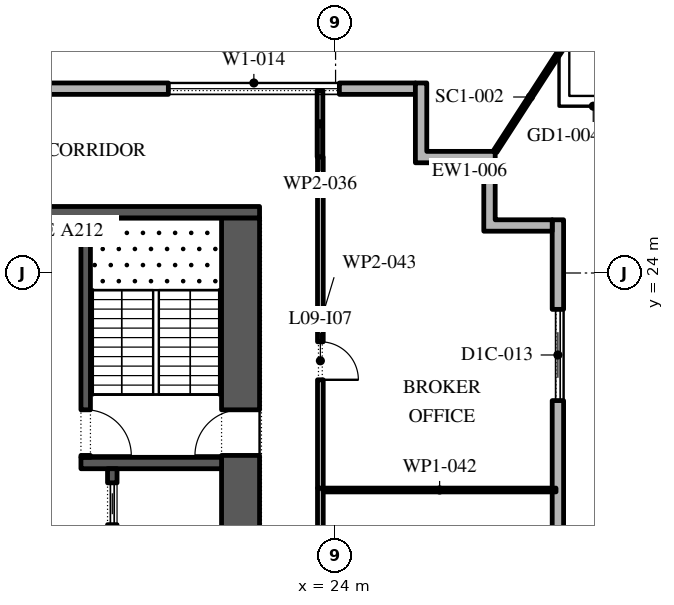
"""IFC4 building model, lengths in metres.
Left out: names, types, materials, properties, quantities, classifications, styles, units other than length and angle.
Written with IfcOpenShell. Run it as: python <this file> out.ifc"""

import sys

from ifc_helpers import new_model, si_unit, direction, frame, frame_2d, origin, place, context, subcontext, project, spatial, polyline, rectangle, outline, extrude, element, fill, save


model = new_model("IFC4")
c1 = context("Model", 3, precision=1e-05, world=origin(), true_north=direction((0.0, 1.0)))
c2 = subcontext(c1, "Body", "Model", "MODEL_VIEW")
j1 = project(units=[si_unit("LENGTHUNIT", "METRE"), si_unit("PLANEANGLEUNIT", "RADIAN")], contexts=[c1])
p1 = place(None, origin())
s1 = spatial("IfcSite", under=j1, at=p1, CompositionType="ELEMENT")
p2 = place(p1, origin())
s2 = spatial("IfcBuilding", under=s1, at=p2, CompositionType="ELEMENT")
p3 = place(p2, frame((0.0, 0.0, 48.0)))
s3 = spatial("IfcBuildingStorey", under=s2, at=p3, CompositionType="ELEMENT", Elevation=48.0)
p4 = place(p3, frame((29.85, -24.1, 0.0), z_axis=(0.0, 0.0, 1.0), x_axis=(0.0, 1.0, 0.0)))
e1 = element("IfcWall", 1, at=p4, inside=s3, PredefinedType="STANDARD", context=c2, shape_type="SweptSolid", body=[
    extrude(rectangle(XDim=49.5, YDim=0.3, at=frame_2d((24.75, 0.0))), origin(), (0.0, 0.0, 1.0), 4.0),
])
p5 = place(p4, frame((1.157, 0.0, 0.45)))
e2 = element("IfcOpeningElement", 2, at=p5, cuts=e1, PredefinedType="OPENING", context=c2, shape_type="SweptSolid", body=[
    extrude(rectangle(XDim=4.5, YDim=3.05, at=frame_2d((2.25, 1.525))), frame((0.0, 0.16, 0.0), z_axis=(0.0, -1.0, 0.0), x_axis=(1.0, 0.0, 0.0)), (0.0, 0.0, 1.0), 0.32),
])
p6 = place(p4, frame((8.121, 0.0, 0.45)))
e3 = element("IfcOpeningElement", 3, at=p6, cuts=e1, PredefinedType="OPENING", context=c2, shape_type="SweptSolid", body=[
    extrude(rectangle(XDim=4.5, YDim=2.825, at=frame_2d((2.25, 1.413))), frame((0.0, 0.16, 0.0), z_axis=(0.0, -1.0, 0.0), x_axis=(1.0, 0.0, 0.0)), (0.0, 0.0, 1.0), 0.32),
])
p7 = place(p4, frame((16.286, 0.0, 0.0)))
e4 = element("IfcOpeningElement", 4, at=p7, cuts=e1, PredefinedType="OPENING", context=c2, shape_type="SweptSolid", body=[
    extrude(rectangle(XDim=2.4, YDim=3.325, at=frame_2d((1.2, 1.663))), frame((0.0, 0.16, 0.0), z_axis=(0.0, -1.0, 0.0), x_axis=(1.0, 0.0, 0.0)), (0.0, 0.0, 1.0), 0.32),
])
p8 = place(p4, frame((22.35, 0.0, 0.45)))
e5 = element("IfcOpeningElement", 5, at=p8, cuts=e1, PredefinedType="OPENING", context=c2, shape_type="SweptSolid", body=[
    extrude(rectangle(XDim=4.5, YDim=2.875, at=frame_2d((2.25, 1.438))), frame((0.0, 0.16, 0.0), z_axis=(0.0, -1.0, 0.0), x_axis=(1.0, 0.0, 0.0)), (0.0, 0.0, 1.0), 0.32),
])
p9 = place(p4, frame((29.464, 0.0, 0.45)))
e6 = element("IfcOpeningElement", 6, at=p9, cuts=e1, PredefinedType="OPENING", context=c2, shape_type="SweptSolid", body=[
    extrude(rectangle(XDim=4.5, YDim=2.875, at=frame_2d((2.25, 1.438))), frame((0.0, 0.16, 0.0), z_axis=(0.0, -1.0, 0.0), x_axis=(1.0, 0.0, 0.0)), (0.0, 0.0, 1.0), 0.32),
])
p10 = place(p4, frame((36.579, 0.0, 0.45)))
e7 = element("IfcOpeningElement", 7, at=p10, cuts=e1, PredefinedType="OPENING", context=c2, shape_type="SweptSolid", body=[
    extrude(rectangle(XDim=4.5, YDim=3.05, at=frame_2d((2.25, 1.525))), frame((0.0, 0.16, 0.0), z_axis=(0.0, -1.0, 0.0), x_axis=(1.0, 0.0, 0.0)), (0.0, 0.0, 1.0), 0.32),
])
p11 = place(p4, frame((44.743, 0.0, 0.0)))
e8 = element("IfcOpeningElement", 8, at=p11, cuts=e1, PredefinedType="OPENING", context=c2, shape_type="SweptSolid", body=[
    extrude(rectangle(XDim=2.4, YDim=3.325, at=frame_2d((1.2, 1.663))), frame((0.0, 0.16, 0.0), z_axis=(0.0, -1.0, 0.0), x_axis=(1.0, 0.0, 0.0)), (0.0, 0.0, 1.0), 0.32),
])
p12 = place(p3, frame((26.1, 28.85, 0.0), z_axis=(0.0, 0.0, 1.0), x_axis=(-1.0, 0.0, 0.0)))
e9 = element("IfcWall", 9, at=p12, inside=s3, PredefinedType="STANDARD", context=c2, shape_type="SweptSolid", body=[
    extrude(rectangle(XDim=52.5, YDim=0.3, at=frame_2d((26.25, 0.0))), origin(), (0.0, 0.0, 1.0), 4.0),
])
p13 = place(p12, frame((2.0, 0.0, 0.45)))
e10 = element("IfcOpeningElement", 10, at=p13, cuts=e9, PredefinedType="OPENING", context=c2, shape_type="SweptSolid", body=[
    extrude(rectangle(XDim=4.5, YDim=3.05, at=frame_2d((2.25, 1.525))), frame((0.0, 0.16, 0.0), z_axis=(0.0, -1.0, 0.0), x_axis=(1.0, 0.0, 0.0)), (0.0, 0.0, 1.0), 0.32),
])
p14 = place(p12, frame((10.65, 0.0, 0.45)))
e11 = element("IfcOpeningElement", 11, at=p14, cuts=e9, PredefinedType="OPENING", context=c2, shape_type="SweptSolid", body=[
    extrude(rectangle(XDim=4.5, YDim=3.05, at=frame_2d((2.25, 1.525))), frame((0.0, 0.16, 0.0), z_axis=(0.0, -1.0, 0.0), x_axis=(1.0, 0.0, 0.0)), (0.0, 0.0, 1.0), 0.32),
])
p15 = place(p12, frame((20.5, 0.0, 0.0)))
e12 = element("IfcOpeningElement", 12, at=p15, cuts=e9, PredefinedType="OPENING", context=c2, shape_type="SweptSolid", body=[
    extrude(rectangle(XDim=2.4, YDim=3.5, at=frame_2d((1.2, 1.75))), frame((0.0, 0.16, 0.0), z_axis=(0.0, -1.0, 0.0), x_axis=(1.0, 0.0, 0.0)), (0.0, 0.0, 1.0), 0.32),
])
p16 = place(p12, frame((28.25, 0.0, 0.45)))
e13 = element("IfcOpeningElement", 13, at=p16, cuts=e9, PredefinedType="OPENING", context=c2, shape_type="SweptSolid", body=[
    extrude(rectangle(XDim=4.5, YDim=3.05, at=frame_2d((2.25, 1.525))), frame((0.0, 0.16, 0.0), z_axis=(0.0, -1.0, 0.0), x_axis=(1.0, 0.0, 0.0)), (0.0, 0.0, 1.0), 0.32),
])
p17 = place(p12, frame((37.05, 0.0, 0.45)))
e14 = element("IfcOpeningElement", 14, at=p17, cuts=e9, PredefinedType="OPENING", context=c2, shape_type="SweptSolid", body=[
    extrude(rectangle(XDim=4.5, YDim=3.05, at=frame_2d((2.25, 1.525))), frame((0.0, 0.16, 0.0), z_axis=(0.0, -1.0, 0.0), x_axis=(1.0, 0.0, 0.0)), (0.0, 0.0, 1.0), 0.32),
])
p18 = place(p12, frame((45.85, 0.0, 0.45)))
e15 = element("IfcOpeningElement", 15, at=p18, cuts=e9, PredefinedType="OPENING", context=c2, shape_type="SweptSolid", body=[
    extrude(rectangle(XDim=4.5, YDim=3.05, at=frame_2d((2.25, 1.525))), frame((0.0, 0.16, 0.0), z_axis=(0.0, -1.0, 0.0), x_axis=(1.0, 0.0, 0.0)), (0.0, 0.0, 1.0), 0.32),
])
p19 = place(p3, origin())
e16 = element("IfcWall", 16, at=p19, inside=s3, PredefinedType="STANDARD", context=c2, shape_type="SweptSolid", body=[
    extrude(outline(polyline([(27.9, 26.9), (26.1, 26.9), (26.1, 29.0), (26.4, 29.0), (26.4, 27.2), (28.2, 27.2), (28.2, 25.4), (29.7, 25.4), (29.7, 25.1), (27.9, 25.1), (27.9, 26.9)])), origin(), (0.0, 0.0, 1.0), 4.0),
])
p20 = place(p3, frame((28.2, 27.2, -0.05), z_axis=(0.0, 0.0, 1.0), x_axis=(0.543224544992, 0.839587454479, 0.0)))
e17 = element("IfcWall", 17, at=p20, inside=s3, PredefinedType="STANDARD", context=c2, shape_type="SweptSolid", body=[
    extrude(rectangle(XDim=3.408, YDim=0.1, at=frame_2d((1.704, 0.0))), origin(), (0.0, 0.0, 1.0), 4.05),
])
p21 = place(p3, frame((21.5, -2.45, 0.0), z_axis=(0.0, 0.0, 1.0), x_axis=(0.0, 1.0, 0.0)))
e18 = element("IfcWall", 18, at=p21, inside=s3, PredefinedType="SHEAR", context=c2, shape_type="SweptSolid", body=[
    extrude(rectangle(XDim=27.9, YDim=1.0, at=frame_2d((13.95, 0.0))), origin(), (0.0, 0.0, 1.0), 4.0),
])
p22 = place(p21, frame((5.05, 0.0, 0.0)))
e19 = element("IfcOpeningElement", 19, at=p22, cuts=e18, PredefinedType="OPENING", context=c2, shape_type="SweptSolid", body=[
    extrude(rectangle(XDim=1.2, YDim=2.1, at=frame_2d((0.6, 1.05))), frame((0.0, 0.51, 0.0), z_axis=(0.0, -1.0, 0.0), x_axis=(1.0, 0.0, 0.0)), (0.0, 0.0, 1.0), 1.02),
])
p23 = place(p21, frame((21.65, 0.0, 0.0)))
e20 = element("IfcOpeningElement", 20, at=p23, cuts=e18, PredefinedType="OPENING", context=c2, shape_type="SweptSolid", body=[
    extrude(rectangle(XDim=1.2, YDim=2.1, at=frame_2d((0.6, 1.05))), frame((0.0, 0.51, 0.0), z_axis=(0.0, -1.0, 0.0), x_axis=(1.0, 0.0, 0.0)), (0.0, 0.0, 1.0), 1.02),
])
p24 = place(p3, frame((10.0, 25.6, 0.0), z_axis=(0.0, 0.0, 1.0), x_axis=(1.0, 0.0, 0.0)))
e21 = element("IfcWall", 21, at=p24, inside=s3, PredefinedType="SHEAR", context=c2, shape_type="SweptSolid", body=[
    extrude(rectangle(XDim=12.0, YDim=0.3, at=frame_2d((6.0, 0.0))), origin(), (0.0, 0.0, 1.0), 4.0),
])
p25 = place(p3, frame((17.3, 19.0, 0.0), z_axis=(0.0, 0.0, 1.0), x_axis=(1.0, 0.0, 0.0)))
e22 = element("IfcWall", 22, at=p25, inside=s3, PredefinedType="SHEAR", context=c2, shape_type="SweptSolid", body=[
    extrude(rectangle(XDim=3.7, YDim=0.3, at=frame_2d((1.85, 0.0))), origin(), (0.0, 0.0, 1.0), 4.0),
])
p26 = place(p3, frame((17.425, 19.15, 0.0), z_axis=(0.0, 0.0, 1.0), x_axis=(0.0, 1.0, 0.0)))
e23 = element("IfcWall", 23, at=p26, inside=s3, PredefinedType="SHEAR", context=c2, shape_type="SweptSolid", body=[
    extrude(rectangle(XDim=6.3, YDim=0.25, at=frame_2d((3.15, 0.0))), origin(), (0.0, 0.0, 1.0), 4.0),
])
p27 = place(p26, frame((0.05, 0.0, 0.0)))
e24 = element("IfcOpeningElement", 24, at=p27, cuts=e23, PredefinedType="OPENING", context=c2, shape_type="SweptSolid", body=[
    extrude(rectangle(XDim=1.2, YDim=2.1, at=frame_2d((0.6, 1.05))), frame((0.0, 0.135, 0.0), z_axis=(0.0, -1.0, 0.0), x_axis=(1.0, 0.0, 0.0)), (0.0, 0.0, 1.0), 0.27),
])
p28 = place(p3, frame((18.125, 4.15, 0.0), z_axis=(0.0, 0.0, 1.0), x_axis=(0.0, 1.0, 0.0)))
e25 = element("IfcWall", 25, at=p28, inside=s3, PredefinedType="SHEAR", context=c2, shape_type="SweptSolid", body=[
    extrude(rectangle(XDim=14.7, YDim=0.25, at=frame_2d((7.35, 0.0))), origin(), (0.0, 0.0, 1.0), 4.0),
])
p29 = place(p28, frame((0.371, 0.0, 0.0)))
e26 = element("IfcOpeningElement", 26, at=p29, cuts=e25, PredefinedType="OPENING", context=c2, shape_type="SweptSolid", body=[
    extrude(rectangle(XDim=1.1, YDim=2.1, at=frame_2d((0.55, 1.05))), frame((0.0, 0.135, 0.0), z_axis=(0.0, -1.0, 0.0), x_axis=(1.0, 0.0, 0.0)), (0.0, 0.0, 1.0), 0.27),
])
p30 = place(p28, frame((2.514, 0.0, 0.0)))
e27 = element("IfcOpeningElement", 27, at=p30, cuts=e25, PredefinedType="OPENING", context=c2, shape_type="SweptSolid", body=[
    extrude(rectangle(XDim=1.1, YDim=2.1, at=frame_2d((0.55, 1.05))), frame((0.0, 0.135, 0.0), z_axis=(0.0, -1.0, 0.0), x_axis=(1.0, 0.0, 0.0)), (0.0, 0.0, 1.0), 0.27),
])
p31 = place(p28, frame((4.657, 0.0, 0.0)))
e28 = element("IfcOpeningElement", 28, at=p31, cuts=e25, PredefinedType="OPENING", context=c2, shape_type="SweptSolid", body=[
    extrude(rectangle(XDim=1.1, YDim=2.1, at=frame_2d((0.55, 1.05))), frame((0.0, 0.135, 0.0), z_axis=(0.0, -1.0, 0.0), x_axis=(1.0, 0.0, 0.0)), (0.0, 0.0, 1.0), 0.27),
])
p32 = place(p28, frame((6.8, 0.0, 0.0)))
e29 = element("IfcOpeningElement", 29, at=p32, cuts=e25, PredefinedType="OPENING", context=c2, shape_type="SweptSolid", body=[
    extrude(rectangle(XDim=1.1, YDim=2.1, at=frame_2d((0.55, 1.05))), frame((0.0, 0.135, 0.0), z_axis=(0.0, -1.0, 0.0), x_axis=(1.0, 0.0, 0.0)), (0.0, 0.0, 1.0), 0.27),
])
p33 = place(p28, frame((8.943, 0.0, 0.0)))
e30 = element("IfcOpeningElement", 30, at=p33, cuts=e25, PredefinedType="OPENING", context=c2, shape_type="SweptSolid", body=[
    extrude(rectangle(XDim=1.1, YDim=2.1, at=frame_2d((0.55, 1.05))), frame((0.0, 0.135, 0.0), z_axis=(0.0, -1.0, 0.0), x_axis=(1.0, 0.0, 0.0)), (0.0, 0.0, 1.0), 0.27),
])
p34 = place(p28, frame((11.086, 0.0, 0.0)))
e31 = element("IfcOpeningElement", 31, at=p34, cuts=e25, PredefinedType="OPENING", context=c2, shape_type="SweptSolid", body=[
    extrude(rectangle(XDim=1.1, YDim=2.1, at=frame_2d((0.55, 1.05))), frame((0.0, 0.135, 0.0), z_axis=(0.0, -1.0, 0.0), x_axis=(1.0, 0.0, 0.0)), (0.0, 0.0, 1.0), 0.27),
])
p35 = place(p28, frame((13.229, 0.0, 0.0)))
e32 = element("IfcOpeningElement", 32, at=p35, cuts=e25, PredefinedType="OPENING", context=c2, shape_type="SweptSolid", body=[
    extrude(rectangle(XDim=1.1, YDim=2.1, at=frame_2d((0.55, 1.05))), frame((0.0, 0.135, 0.0), z_axis=(0.0, -1.0, 0.0), x_axis=(1.0, 0.0, 0.0)), (0.0, 0.0, 1.0), 0.27),
])
p36 = place(p3, frame((23.59, 28.8, 0.0), z_axis=(0.0, 0.0, 1.0), x_axis=(0.0, -1.0, 0.0)))
e33 = element("IfcWall", 33, at=p36, inside=s3, PredefinedType="PARTITIONING", context=c2, shape_type="SweptSolid", body=[
    extrude(rectangle(XDim=1.75, YDim=0.15, at=frame_2d((0.875, 0.0))), origin(), (0.0, 0.0, 1.0), 4.0),
])
p37 = place(p3, frame((23.6, 18.34, 0.0), z_axis=(0.0, 0.0, 1.0), x_axis=(0.0, -1.0, 0.0)))
e34 = element("IfcWall", 34, at=p37, inside=s3, PredefinedType="PARTITIONING", context=c2, shape_type="SweptSolid", body=[
    extrude(rectangle(XDim=14.23, YDim=0.15, at=frame_2d((7.115, 0.0))), origin(), (0.0, 0.0, 1.0), 4.0),
])
p38 = place(p37, frame((6.63, 0.0, 0.0)))
e35 = element("IfcOpeningElement", 35, at=p38, cuts=e34, PredefinedType="OPENING", context=c2, shape_type="SweptSolid", body=[
    extrude(rectangle(XDim=1.0, YDim=2.1, at=frame_2d((0.5, 1.05))), frame((0.0, 0.085, 0.0), z_axis=(0.0, -1.0, 0.0), x_axis=(1.0, 0.0, 0.0)), (0.0, 0.0, 1.0), 0.17),
])
p39 = place(p3, frame((23.675, 18.29, 0.0), z_axis=(0.0, 0.0, 1.0), x_axis=(1.0, 0.0, 0.0)))
e36 = element("IfcWall", 36, at=p39, inside=s3, PredefinedType="PARTITIONING", context=c2, shape_type="SweptSolid", body=[
    extrude(rectangle(XDim=6.125, YDim=0.1, at=frame_2d((3.062, 0.0))), origin(), (0.0, 0.0, 1.0), 4.0),
])
p40 = place(p3, frame((23.6, 27.05, 0.0), z_axis=(0.0, 0.0, 1.0), x_axis=(0.0, -1.0, 0.0)))
e37 = element("IfcWall", 37, at=p40, inside=s3, PredefinedType="PARTITIONING", context=c2, shape_type="SweptSolid", body=[
    extrude(rectangle(XDim=8.71, YDim=0.15, at=frame_2d((4.355, 0.0))), origin(), (0.0, 0.0, 1.0), 4.0),
])
p41 = place(p40, frame((4.86, 0.0, 0.0)))
e38 = element("IfcOpeningElement", 38, at=p41, cuts=e37, PredefinedType="OPENING", context=c2, shape_type="SweptSolid", body=[
    extrude(rectangle(XDim=1.0, YDim=2.1, at=frame_2d((0.5, 1.05))), frame((0.0, 0.085, 0.0), z_axis=(0.0, -1.0, 0.0), x_axis=(1.0, 0.0, 0.0)), (0.0, 0.0, 1.0), 0.17),
])
p42 = place(p11, origin())
e39 = element("IfcDoor", 39, at=p42, inside=s3, OperationType="DOUBLE_DOOR_SLIDING", PredefinedType="DOOR", context=c2, shape_type="SweptSolid", body=[
    extrude(rectangle(XDim=2.4, YDim=3.325, at=frame_2d((1.2, 1.663))), frame((0.0, 0.025, 0.0), z_axis=(0.0, -1.0, 0.0), x_axis=(1.0, 0.0, 0.0)), (0.0, 0.0, 1.0), 0.05),
])
fill(e8, e39)
p43 = place(p13, origin())
e40 = element("IfcWindow", 40, at=p43, inside=s3, PartitioningType="DOUBLE_PANEL_VERTICAL", PredefinedType="WINDOW", context=c2, shape_type="SweptSolid", body=[
    extrude(rectangle(XDim=4.5, YDim=3.05, at=frame_2d((2.25, 1.525))), frame((0.0, 0.03, 0.0), z_axis=(0.0, -1.0, 0.0), x_axis=(1.0, 0.0, 0.0)), (0.0, 0.0, 1.0), 0.06),
])
fill(e10, e40)
p44 = place(p35, origin())
e41 = element("IfcDoor", 41, at=p44, inside=s3, OperationType="SLIDING_TO_LEFT", PredefinedType="DOOR", context=c2, shape_type="SweptSolid", body=[
    extrude(rectangle(XDim=1.1, YDim=2.1, at=frame_2d((0.55, 1.05))), frame((0.0, 0.025, 0.0), z_axis=(0.0, -1.0, 0.0), x_axis=(1.0, 0.0, 0.0)), (0.0, 0.0, 1.0), 0.05),
])
fill(e32, e41)
p45 = place(p27, frame((1.2, 0.0, 0.0), z_axis=(0.0, 0.0, 1.0), x_axis=(-1.0, 0.0, 0.0)))
e42 = element("IfcDoor", 42, at=p45, inside=s3, OperationType="SINGLE_SWING_LEFT", PredefinedType="DOOR", context=c2, shape_type="SweptSolid", body=[
    extrude(rectangle(XDim=1.2, YDim=2.1, at=frame_2d((0.6, 1.05))), frame((0.0, 0.025, 0.0), z_axis=(0.0, -1.0, 0.0), x_axis=(1.0, 0.0, 0.0)), (0.0, 0.0, 1.0), 0.05),
])
fill(e24, e42)
p46 = place(p23, origin())
e43 = element("IfcDoor", 43, at=p46, inside=s3, OperationType="SINGLE_SWING_RIGHT", PredefinedType="DOOR", context=c2, shape_type="SweptSolid", body=[
    extrude(rectangle(XDim=1.2, YDim=2.1, at=frame_2d((0.6, 1.05))), frame((0.0, 0.025, 0.0), z_axis=(0.0, -1.0, 0.0), x_axis=(1.0, 0.0, 0.0)), (0.0, 0.0, 1.0), 0.05),
])
fill(e20, e43)
p47 = place(p41, origin())
e44 = element("IfcDoor", 44, at=p47, inside=s3, OperationType="SINGLE_SWING_LEFT", PredefinedType="DOOR", context=c2, shape_type="SweptSolid", body=[
    extrude(rectangle(XDim=1.0, YDim=2.1, at=frame_2d((0.5, 1.05))), frame((0.0, 0.025, 0.0), z_axis=(0.0, -1.0, 0.0), x_axis=(1.0, 0.0, 0.0)), (0.0, 0.0, 1.0), 0.05),
])
fill(e38, e44)
save(model, sys.argv[1])
